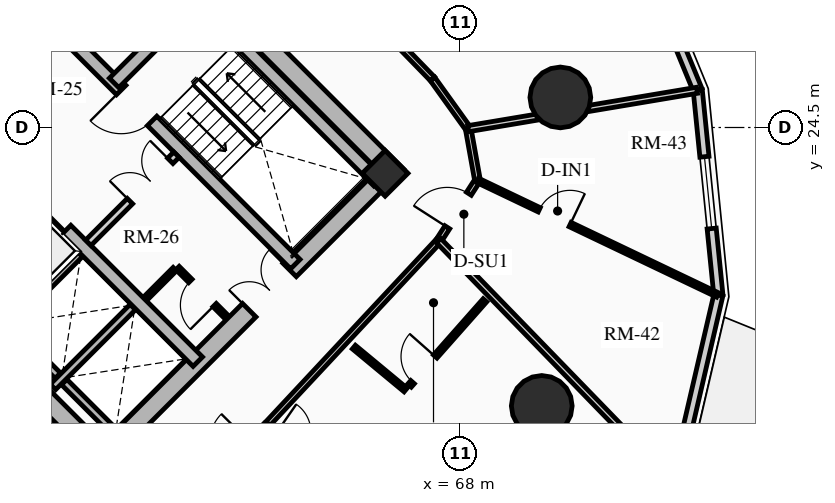
"""IFC4 building model, lengths in metres.
Left out: names, types, materials, properties, quantities, classifications, styles, units other than length and angle.
Written with IfcOpenShell. Run it as: python <this file> out.ifc"""

import sys

from ifc_helpers import new_model, si_unit, direction, frame, frame_2d, origin, origin_2d, place, context, subcontext, project, spatial, rectangle, circle, extrude, source, transform, mapped, element, fill, save


model = new_model("IFC4")
c1 = context("Model", 3, precision=1e-05, world=origin(), true_north=direction((0.0, 1.0)))
c2 = subcontext(c1, "Body", "Model", "MODEL_VIEW")
j1 = project(units=[si_unit("LENGTHUNIT", "METRE"), si_unit("PLANEANGLEUNIT", "RADIAN")], contexts=[c1])
p1 = place(None, origin())
s1 = spatial("IfcSite", under=j1, at=p1, CompositionType="ELEMENT")
p2 = place(p1, origin())
s2 = spatial("IfcBuilding", under=s1, at=p2, CompositionType="ELEMENT")
p3 = place(p2, frame((0.0, 0.0, 39.46)))
s3 = spatial("IfcBuildingStorey", under=s2, at=p3, CompositionType="ELEMENT", Elevation=39.46)
for number, where, z_axis, x_axis in (
    (1, (58.773, 15.661, 0.0), (0.0, 0.0, 1.0), (-0.707, 0.707, 0.0)),
    (2, (66.339, 23.227, 0.0), (0.0, 0.0, 1.0), (-0.707, 0.707, 0.0)),
):
    element("IfcWall", number, at=place(p3, frame(where, z_axis=z_axis, x_axis=x_axis)), inside=s3, PredefinedType="SHEAR", context=c2, shape_type="SweptSolid", body=[
        extrude(rectangle(XDim=14.3, YDim=0.5, at=frame_2d((7.15, 0.0))), origin(), (0.0, 0.0, 1.0), 2.91),
    ])
p4 = place(p3, frame((58.596, 15.838, 0.0), z_axis=(0.0, 0.0, 1.0), x_axis=(0.707106781187, 0.707106781187, 0.0)))
e3 = element("IfcWall", 3, at=p4, inside=s3, PredefinedType="SHEAR", context=c2, shape_type="SweptSolid", body=[
    extrude(rectangle(XDim=10.7, YDim=0.5, at=frame_2d((5.35, 0.0))), origin(), (0.0, 0.0, 1.0), 2.91),
])
m1 = source(origin(), c2, "Body", "SweptSolid", [
    extrude(rectangle(XDim=1.5, YDim=2.02, at=frame_2d((0.75, 1.01))), frame((0.0, 0.26, 0.0), z_axis=(0.0, -1.0, 0.0), x_axis=(1.0, 0.0, 0.0)), (0.0, 0.0, 1.0), 0.52),
])
p5 = place(p4, frame((5.45, 0.0, 0.0)))
e4 = element("IfcOpeningElement", 4, at=p5, cuts=e3, PredefinedType="OPENING", context=c2, shape_type="MappedRepresentation", body=[
    mapped(m1, transform((0.0, 0.0, 0.0), x_axis=(1.0, 0.0, 0.0), y_axis=(0.0, 1.0, 0.0), z_axis=(0.0, 0.0, 1.0), scale=1.0)),
])
p6 = place(p3, frame((61.096, 18.338, 0.0), z_axis=(0.0, 0.0, 1.0), x_axis=(-0.707106781187, 0.707106781187, 0.0)))
e5 = element("IfcWall", 5, at=p6, inside=s3, PredefinedType="SHEAR", context=c2, shape_type="SweptSolid", body=[
    extrude(rectangle(XDim=13.8, YDim=0.35, at=frame_2d((6.9, 0.0))), origin(), (0.0, 0.0, 1.0), 2.91),
])
m2 = source(origin(), c2, "Body", "SweptSolid", [
    extrude(rectangle(XDim=1.1, YDim=2.015, at=frame_2d((0.55, 1.007))), frame((0.0, 0.185, 0.0), z_axis=(0.0, -1.0, 0.0), x_axis=(1.0, 0.0, 0.0)), (0.0, 0.0, 1.0), 0.37),
])
p7 = place(p6, frame((4.9, 0.0, 0.0)))
e6 = element("IfcOpeningElement", 6, at=p7, cuts=e5, PredefinedType="OPENING", context=c2, shape_type="MappedRepresentation", body=[
    mapped(m2, transform((0.0, 0.0, 0.0), x_axis=(1.0, 0.0, 0.0), y_axis=(0.0, 1.0, 0.0), z_axis=(0.0, 0.0, 1.0), scale=1.0)),
])
m3 = source(origin(), c2, "Body", "SweptSolid", [
    extrude(rectangle(XDim=1.15, YDim=2.02, at=frame_2d((0.575, 1.01))), frame((0.0, 0.185, 0.0), z_axis=(0.0, -1.0, 0.0), x_axis=(1.0, 0.0, 0.0)), (0.0, 0.0, 1.0), 0.37),
])
p8 = place(p6, frame((7.32, 0.0, 0.0)))
e7 = element("IfcOpeningElement", 7, at=p8, cuts=e5, PredefinedType="OPENING", context=c2, shape_type="MappedRepresentation", body=[
    mapped(m3, transform((0.0, 0.0, 0.0), x_axis=(1.0, 0.0, 0.0), y_axis=(0.0, 1.0, 0.0), z_axis=(0.0, 0.0, 1.0), scale=1.0)),
])
p9 = place(p3, frame((63.662, 20.904, 0.0), z_axis=(0.0, 0.0, 1.0), x_axis=(-0.707106781187, 0.707106781187, 0.0)))
e8 = element("IfcWall", 8, at=p9, inside=s3, PredefinedType="SHEAR", context=c2, shape_type="SweptSolid", body=[
    extrude(rectangle(XDim=13.8, YDim=0.35, at=frame_2d((6.9, 0.0))), origin(), (0.0, 0.0, 1.0), 2.91),
])
p10 = place(p9, frame((10.025, 0.0, 0.0)))
e9 = element("IfcOpeningElement", 9, at=p10, cuts=e8, PredefinedType="OPENING", context=c2, shape_type="MappedRepresentation", body=[
    mapped(m2, transform((0.0, 0.0, 0.0), x_axis=(1.0, 0.0, 0.0), y_axis=(0.0, 1.0, 0.0), z_axis=(0.0, 0.0, 1.0), scale=1.0)),
])
p11 = place(p9, frame((12.025, 0.0, 0.0)))
e10 = element("IfcOpeningElement", 10, at=p11, cuts=e8, PredefinedType="OPENING", context=c2, shape_type="MappedRepresentation", body=[
    mapped(m2, transform((0.0, 0.0, 0.0), x_axis=(1.0, 0.0, 0.0), y_axis=(0.0, 1.0, 0.0), z_axis=(0.0, 0.0, 1.0), scale=1.0)),
])
p12 = place(p9, frame((5.33, 0.0, 0.0)))
e11 = element("IfcOpeningElement", 11, at=p12, cuts=e8, PredefinedType="OPENING", context=c2, shape_type="MappedRepresentation", body=[
    mapped(m3, transform((0.0, 0.0, 0.0), x_axis=(1.0, 0.0, 0.0), y_axis=(0.0, 1.0, 0.0), z_axis=(0.0, 0.0, 1.0), scale=1.0)),
])
p13 = place(p3, frame((65.847, 23.089, 0.0), z_axis=(0.0, 0.0, 1.0), x_axis=(-0.707106781187, 0.707106781187, 0.0)))
e12 = element("IfcWall", 12, at=p13, inside=s3, PredefinedType="SHEAR", context=c2, shape_type="SweptSolid", body=[
    extrude(rectangle(XDim=6.745, YDim=0.35, at=frame_2d((3.373, 0.0))), origin(), (0.0, 0.0, 1.0), 2.91),
])
p14 = place(p3, frame((58.893, 25.674, 0.0), z_axis=(0.0, 0.0, 1.0), x_axis=(0.707106781187, 0.707106781187, 0.0)))
e13 = element("IfcWall", 13, at=p14, inside=s3, PredefinedType="SHEAR", context=c2, shape_type="SweptSolid", body=[
    extrude(rectangle(XDim=3.285, YDim=0.35, at=frame_2d((1.643, 0.0))), origin(), (0.0, 0.0, 1.0), 2.91),
])
p15 = place(p3, frame((66.024, 23.294, 0.0), z_axis=(0.0, 0.0, 1.0), x_axis=(0.707106781187, 0.707106781187, 0.0)))
e14 = element("IfcColumn", 14, at=p15, inside=s3, PredefinedType="COLUMN", context=c2, shape_type="SweptSolid", body=[
    extrude(rectangle(XDim=0.85, YDim=0.85, at=origin_2d()), origin(), (0.0, 0.0, 1.0), 2.91),
])
for number, where, z_axis, x_axis in (
    (15, (70.146, 17.173, 0.0), (0.0, 0.0, 1.0), (1.0, 0.0, 0.0)),
    (16, (70.635, 25.291, 0.0), (0.0, 0.0, 1.0), (1.0, 0.0, 0.0)),
):
    element("IfcColumn", number, at=place(p3, frame(where, z_axis=z_axis, x_axis=x_axis)), inside=s3, PredefinedType="USERDEFINED", context=c2, shape_type="SweptSolid", body=[
        extrude(circle(Radius=0.8, at=origin_2d()), origin(), (0.0, 0.0, 1.0), 2.91),
    ])
p16 = place(p3, frame((74.794, 20.09, 0.0), z_axis=(0.0, 0.0, 1.0), x_axis=(-0.22582585901, -0.974167686491, 0.0)))
e17 = element("IfcWall", 17, at=p16, inside=s3, PredefinedType="SOLIDWALL", context=c2, shape_type="SweptSolid", body=[
    extrude(rectangle(XDim=5.092, YDim=0.24, at=frame_2d((2.546, 0.0))), origin(), (0.0, 0.0, 1.0), 2.073),
])
p17 = place(p3, frame((74.251, 25.482, 0.0), z_axis=(0.0, 0.0, 1.0), x_axis=(0.100190592135, -0.994968263437, 0.0)))
e18 = element("IfcWall", 18, at=p17, inside=s3, PredefinedType="SOLIDWALL", context=c2, shape_type="SweptSolid", body=[
    extrude(rectangle(XDim=5.419, YDim=0.24, at=frame_2d((2.71, 0.0))), origin(), (0.0, 0.0, 1.0), 2.073),
])
m4 = source(origin(), c2, "Body", "SweptSolid", [
    extrude(rectangle(XDim=1.9, YDim=1.35, at=frame_2d((0.95, 0.675))), frame((0.0, 0.13, 0.0), z_axis=(0.0, -1.0, 0.0), x_axis=(1.0, 0.0, 0.0)), (0.0, 0.0, 1.0), 0.26),
])
p18 = place(p17, frame((1.76, 0.0, 0.65)))
e19 = element("IfcOpeningElement", 19, at=p18, cuts=e18, PredefinedType="OPENING", context=c2, shape_type="MappedRepresentation", body=[
    mapped(m4, transform((0.0, 0.0, 0.0), x_axis=(1.0, 0.0, 0.0), y_axis=(0.0, 1.0, 0.0), z_axis=(0.0, 0.0, 1.0), scale=1.0)),
])
p19 = place(p3, frame((72.068, 30.778, 0.0), z_axis=(0.0, 0.0, 1.0), x_axis=(0.381077764176, -0.924542988536, 0.0)))
e20 = element("IfcWall", 20, at=p19, inside=s3, PredefinedType="SOLIDWALL", context=c2, shape_type="SweptSolid", body=[
    extrude(rectangle(XDim=5.728, YDim=0.24, at=frame_2d((2.864, 0.0))), origin(), (0.0, 0.0, 1.0), 2.073),
])
p20 = place(p3, frame((55.888, 19.069, 0.0), z_axis=(0.0, 0.0, 1.0), x_axis=(0.707106781187, 0.707106781187, 0.0)))
e21 = element("IfcWall", 21, at=p20, inside=s3, PredefinedType="SHEAR", context=c2, shape_type="SweptSolid", body=[
    extrude(rectangle(XDim=2.97, YDim=0.2, at=frame_2d((1.485, 0.0))), origin(), (0.0, 0.0, 1.0), 2.91),
])
p21 = place(p3, frame((57.284, 17.673, 0.0), z_axis=(0.0, 0.0, 1.0), x_axis=(0.707147878904, 0.70706568108, 0.0)))
e22 = element("IfcWall", 22, at=p21, inside=s3, PredefinedType="SHEAR", context=c2, shape_type="SweptSolid", body=[
    extrude(rectangle(XDim=2.97, YDim=0.2, at=frame_2d((1.485, 0.0))), origin(), (0.0, 0.0, 1.0), 2.91),
])
p22 = place(p3, frame((57.412, 17.97, 0.0), z_axis=(0.0, 0.0, 1.0), x_axis=(-0.707106781187, 0.707106781187, 0.0)))
e23 = element("IfcWall", 23, at=p22, inside=s3, PredefinedType="SHEAR", context=c2, shape_type="SweptSolid", body=[
    extrude(rectangle(XDim=1.735, YDim=0.2, at=frame_2d((0.867, 0.0))), origin(), (0.0, 0.0, 1.0), 2.91),
])
p23 = place(p3, frame((58.737, 16.644, 0.0), z_axis=(0.0, 0.0, 1.0), x_axis=(-0.707032117043, 0.707181437447, 0.0)))
e24 = element("IfcWall", 24, at=p23, inside=s3, PredefinedType="SHEAR", context=c2, shape_type="SweptSolid", body=[
    extrude(rectangle(XDim=1.635, YDim=0.2, at=frame_2d((0.817, 0.0))), origin(), (0.0, 0.0, 1.0), 2.91),
])
p24 = place(p3, frame((58.214, 21.467, 0.0), z_axis=(0.0, 0.0, 1.0), x_axis=(0.707106781187, 0.707106781187, 0.0)))
e25 = element("IfcWall", 25, at=p24, inside=s3, PredefinedType="PARTITIONING", context=c2, shape_type="SweptSolid", body=[
    extrude(rectangle(XDim=3.28, YDim=0.2, at=frame_2d((1.64, 0.0))), origin(), (0.0, 0.0, 1.0), 2.635),
])
m5 = source(origin(), c2, "Body", "SweptSolid", [
    extrude(rectangle(XDim=1.5, YDim=2.02, at=frame_2d((0.75, 1.01))), frame((0.0, 0.11, 0.0), z_axis=(0.0, -1.0, 0.0), x_axis=(1.0, 0.0, 0.0)), (0.0, 0.0, 1.0), 0.22),
])
p25 = place(p24, frame((1.55, 0.0, 0.0)))
e26 = element("IfcOpeningElement", 26, at=p25, cuts=e25, PredefinedType="OPENING", context=c2, shape_type="MappedRepresentation", body=[
    mapped(m5, transform((0.0, 0.0, 0.0), x_axis=(1.0, 0.0, 0.0), y_axis=(0.0, 1.0, 0.0), z_axis=(0.0, 0.0, 1.0), scale=1.0)),
])
p26 = place(p3, frame((54.961, 24.719, 0.0), z_axis=(0.0, 0.0, 1.0), x_axis=(0.707106781187, 0.707106781187, 0.0)))
e27 = element("IfcWall", 27, at=p26, inside=s3, PredefinedType="PARTITIONING", context=c2, shape_type="SweptSolid", body=[
    extrude(rectangle(XDim=3.28, YDim=0.2, at=frame_2d((1.64, 0.0))), origin(), (0.0, 0.0, 1.0), 2.635),
])
m6 = source(origin(), c2, "Body", "SweptSolid", [
    extrude(rectangle(XDim=0.9, YDim=2.005, at=frame_2d((0.45, 1.002))), frame((0.0, 0.11, 0.0), z_axis=(0.0, -1.0, 0.0), x_axis=(1.0, 0.0, 0.0)), (0.0, 0.0, 1.0), 0.22),
])
p27 = place(p26, frame((0.16, 0.0, 0.0)))
e28 = element("IfcOpeningElement", 28, at=p27, cuts=e27, PredefinedType="OPENING", context=c2, shape_type="MappedRepresentation", body=[
    mapped(m6, transform((0.0, 0.0, 0.0), x_axis=(1.0, 0.0, 0.0), y_axis=(0.0, 1.0, 0.0), z_axis=(0.0, 0.0, 1.0), scale=1.0)),
])
p28 = place(p3, frame((61.835, 19.529, 0.0), z_axis=(0.0, 0.0, 1.0), x_axis=(-0.707174592913, 0.707038962956, 0.0)))
e29 = element("IfcWall", 29, at=p28, inside=s3, PredefinedType="PARTITIONING", context=c2, shape_type="SweptSolid", body=[
    extrude(rectangle(XDim=1.8, YDim=0.125, at=frame_2d((0.9, 0.0))), origin(), (0.0, 0.0, 1.0), 2.635),
])
m7 = source(origin(), c2, "Body", "SweptSolid", [
    extrude(rectangle(XDim=0.9, YDim=2.005, at=frame_2d((0.45, 1.002))), frame((0.0, 0.073, 0.0), z_axis=(0.0, -1.0, 0.0), x_axis=(1.0, 0.0, 0.0)), (0.0, 0.0, 1.0), 0.145),
])
p29 = place(p28, frame((0.42, 0.0, 0.0)))
e30 = element("IfcOpeningElement", 30, at=p29, cuts=e29, PredefinedType="OPENING", context=c2, shape_type="MappedRepresentation", body=[
    mapped(m7, transform((0.0, 0.0, 0.0), x_axis=(1.0, 0.0, 0.0), y_axis=(0.0, 1.0, 0.0), z_axis=(0.0, 0.0, 1.0), scale=1.0)),
])
p30 = place(p3, frame((59.713, 19.996, 0.0), z_axis=(0.0, 0.0, 1.0), x_axis=(0.707217726, 0.706995818963, 0.0)))
e31 = element("IfcWall", 31, at=p30, inside=s3, PredefinedType="PARTITIONING", context=c2, shape_type="SweptSolid", body=[
    extrude(rectangle(XDim=1.1, YDim=0.125, at=frame_2d((0.55, 0.0))), origin(), (0.0, 0.0, 1.0), 2.635),
])
p31 = place(p3, frame((62.903, 16.667, 0.0), z_axis=(0.0, 0.0, 1.0), x_axis=(0.682371947497, 0.731005147225, 0.0)))
e32 = element("IfcWall", 32, at=p31, inside=s3, PredefinedType="PARTITIONING", context=c2, shape_type="SweptSolid", body=[
    extrude(rectangle(XDim=6.642, YDim=0.15, at=frame_2d((3.321, 0.0))), origin(), (0.0, 0.0, 1.0), 2.159),
])
p32 = place(p3, frame((67.435, 21.521, 0.0), z_axis=(0.0, 0.0, 1.0), x_axis=(0.540777197838, 0.841165870859, 0.0)))
e33 = element("IfcWall", 33, at=p32, inside=s3, PredefinedType="PARTITIONING", context=c2, shape_type="SweptSolid", body=[
    extrude(rectangle(XDim=1.888, YDim=0.15, at=frame_2d((0.944, 0.0))), origin(), (0.0, 0.0, 1.0), 2.205),
])
m8 = source(origin(), c2, "Body", "SweptSolid", [
    extrude(rectangle(XDim=1.05, YDim=2.015, at=frame_2d((0.525, 1.007))), frame((0.0, 0.085, 0.0), z_axis=(0.0, -1.0, 0.0), x_axis=(1.0, 0.0, 0.0)), (0.0, 0.0, 1.0), 0.17),
])
p33 = place(p32, frame((0.419, 0.0, 0.0)))
e34 = element("IfcOpeningElement", 34, at=p33, cuts=e33, PredefinedType="OPENING", context=c2, shape_type="MappedRepresentation", body=[
    mapped(m8, transform((0.0, 0.0, 0.0), x_axis=(1.0, 0.0, 0.0), y_axis=(0.0, 1.0, 0.0), z_axis=(0.0, 0.0, 1.0), scale=1.0)),
])
p34 = place(p3, frame((68.456, 23.11, 0.0), z_axis=(0.0, 0.0, 1.0), x_axis=(-0.1772522795, 0.984165448191, 0.0)))
e35 = element("IfcWall", 35, at=p34, inside=s3, PredefinedType="PARTITIONING", context=c2, shape_type="SweptSolid", body=[
    extrude(rectangle(XDim=1.382, YDim=0.15, at=frame_2d((0.691, 0.0))), origin(), (0.0, 0.0, 1.0), 2.159),
])
p35 = place(p3, frame((68.211, 24.469, 0.0), z_axis=(0.0, 0.0, 1.0), x_axis=(-0.583012141368, 0.812463441034, 0.0)))
e36 = element("IfcWall", 36, at=p35, inside=s3, PredefinedType="PARTITIONING", context=c2, shape_type="SweptSolid", body=[
    extrude(rectangle(XDim=1.613, YDim=0.15, at=frame_2d((0.807, 0.0))), origin(), (0.0, 0.0, 1.0), 2.205),
])
p36 = place(p3, frame((67.27, 25.78, 0.0), z_axis=(0.0, 0.0, 1.0), x_axis=(-0.696847842907, 0.717218992942, 0.0)))
e37 = element("IfcWall", 37, at=p36, inside=s3, PredefinedType="PARTITIONING", context=c2, shape_type="SweptSolid", body=[
    extrude(rectangle(XDim=6.004, YDim=0.15, at=frame_2d((3.002, 0.0))), origin(), (0.0, 0.0, 1.0), 2.635),
])
m9 = source(origin(), c2, "Body", "SweptSolid", [
    extrude(rectangle(XDim=1.0, YDim=2.015, at=frame_2d((0.5, 1.007))), frame((0.0, 0.085, 0.0), z_axis=(0.0, -1.0, 0.0), x_axis=(1.0, 0.0, 0.0)), (0.0, 0.0, 1.0), 0.17),
])
p37 = place(p36, frame((2.502, 0.0, 0.0)))
e38 = element("IfcOpeningElement", 38, at=p37, cuts=e37, PredefinedType="OPENING", context=c2, shape_type="MappedRepresentation", body=[
    mapped(m9, transform((0.0, 0.0, 0.0), x_axis=(1.0, 0.0, 0.0), y_axis=(0.0, 1.0, 0.0), z_axis=(0.0, 0.0, 1.0), scale=1.0)),
])
p38 = place(p3, frame((67.435, 21.521, 0.0), z_axis=(0.0, 0.0, 1.0), x_axis=(0.6962628802, -0.717786877601, 0.0)))
e39 = element("IfcWall", 39, at=p38, inside=s3, PredefinedType="PARTITIONING", context=c2, shape_type="SweptSolid", body=[
    extrude(rectangle(XDim=8.893, YDim=0.16, at=frame_2d((4.446, 0.0))), origin(), (0.0, 0.0, 1.0), 2.073),
])
p39 = place(p3, frame((68.211, 24.469, 0.0), z_axis=(0.0, 0.0, 1.0), x_axis=(0.986231309699, 0.165371713934, 0.0)))
e40 = element("IfcWall", 40, at=p39, inside=s3, PredefinedType="PARTITIONING", context=c2, shape_type="SweptSolid", body=[
    extrude(rectangle(XDim=6.104, YDim=0.16, at=frame_2d((3.052, 0.0))), origin(), (0.0, 0.0, 1.0), 2.073),
])
p40 = place(p3, frame((65.202, 18.721, 0.0), z_axis=(0.0, 0.0, 1.0), x_axis=(0.769814202386, -0.638268042287, 0.0)))
e41 = element("IfcWall", 41, at=p40, inside=s3, PredefinedType="PARTITIONING", context=c2, shape_type="SweptSolid", body=[
    extrude(rectangle(XDim=1.769, YDim=0.125, at=frame_2d((0.884, 0.0))), origin(), (0.0, 0.0, 1.0), 2.635),
])
p41 = place(p3, frame((66.667, 17.709, 0.0), z_axis=(0.0, 0.0, 1.0), x_axis=(0.662510581678, 0.749052554341, 0.0)))
e42 = element("IfcWall", 42, at=p41, inside=s3, PredefinedType="PARTITIONING", context=c2, shape_type="SweptSolid", body=[
    extrude(rectangle(XDim=2.996, YDim=0.125, at=frame_2d((1.498, 0.0))), origin(), (0.0, 0.0, 1.0), 2.159),
])
p42 = place(p41, frame((0.12, 0.0, 0.0)))
e43 = element("IfcOpeningElement", 43, at=p42, cuts=e42, PredefinedType="OPENING", context=c2, shape_type="MappedRepresentation", body=[
    mapped(m7, transform((0.0, 0.0, 0.0), x_axis=(1.0, 0.0, 0.0), y_axis=(0.0, 1.0, 0.0), z_axis=(0.0, 0.0, 1.0), scale=1.0)),
])
p43 = place(p3, frame((68.456, 23.11, 0.0), z_axis=(0.0, 0.0, 1.0), x_axis=(0.902430819297, -0.430834790125, 0.0)))
e44 = element("IfcWall", 44, at=p43, inside=s3, PredefinedType="PARTITIONING", context=c2, shape_type="SweptSolid", body=[
    extrude(rectangle(XDim=7.002, YDim=0.125, at=frame_2d((3.501, 0.0))), origin(), (0.0, 0.0, 1.0), 2.073),
])
p44 = place(p43, frame((1.8, 0.0, 0.0)))
e45 = element("IfcOpeningElement", 45, at=p44, cuts=e44, PredefinedType="OPENING", context=c2, shape_type="MappedRepresentation", body=[
    mapped(m7, transform((0.0, 0.0, 0.0), x_axis=(1.0, 0.0, 0.0), y_axis=(0.0, 1.0, 0.0), z_axis=(0.0, 0.0, 1.0), scale=1.0)),
])
m10 = source(origin(), c2, "Body", "SweptSolid", [
    extrude(rectangle(XDim=1.9, YDim=1.35, at=frame_2d((0.95, 0.675))), frame((0.0, 0.03, 0.0), z_axis=(0.0, -1.0, 0.0), x_axis=(1.0, 0.0, 0.0)), (0.0, 0.0, 1.0), 0.06),
])
p45 = place(p18, origin())
e46 = element("IfcWindow", 46, at=p45, inside=s3, PartitioningType="DOUBLE_PANEL_VERTICAL", PredefinedType="WINDOW", context=c2, shape_type="MappedRepresentation", body=[
    mapped(m10, transform((0.0, 0.0, 0.0), x_axis=(1.0, 0.0, 0.0), y_axis=(0.0, 1.0, 0.0), z_axis=(0.0, 0.0, 1.0), scale=1.0)),
])
fill(e19, e46)
m11 = source(origin(), c2, "Body", "SweptSolid", [
    extrude(rectangle(XDim=1.1, YDim=2.015, at=frame_2d((0.55, 1.007))), frame((0.0, 0.025, 0.0), z_axis=(0.0, -1.0, 0.0), x_axis=(1.0, 0.0, 0.0)), (0.0, 0.0, 1.0), 0.05),
])
p46 = place(p7, origin())
e47 = element("IfcDoor", 47, at=p46, inside=s3, OperationType="SLIDING_TO_LEFT", PredefinedType="DOOR", context=c2, shape_type="MappedRepresentation", body=[
    mapped(m11, transform((0.0, 0.0, 0.0), x_axis=(1.0, 0.0, 0.0), y_axis=(0.0, 1.0, 0.0), z_axis=(0.0, 0.0, 1.0), scale=1.0)),
])
fill(e6, e47)
m12 = source(origin(), c2, "Body", "SweptSolid", [
    extrude(rectangle(XDim=1.15, YDim=2.02, at=frame_2d((0.575, 1.01))), frame((0.0, 0.025, 0.0), z_axis=(0.0, -1.0, 0.0), x_axis=(1.0, 0.0, 0.0)), (0.0, 0.0, 1.0), 0.05),
])
p47 = place(p12, origin())
e48 = element("IfcDoor", 48, at=p47, inside=s3, OperationType="SINGLE_SWING_RIGHT", PredefinedType="DOOR", context=c2, shape_type="MappedRepresentation", body=[
    mapped(m12, transform((0.0, 0.0, 0.0), x_axis=(1.0, 0.0, 0.0), y_axis=(0.0, 1.0, 0.0), z_axis=(0.0, 0.0, 1.0), scale=1.0)),
])
fill(e11, e48)
m13 = source(origin(), c2, "Body", "SweptSolid", [
    extrude(rectangle(XDim=1.5, YDim=2.02, at=frame_2d((0.75, 1.01))), frame((0.0, 0.025, 0.0), z_axis=(0.0, -1.0, 0.0), x_axis=(1.0, 0.0, 0.0)), (0.0, 0.0, 1.0), 0.05),
])
p48 = place(p5, origin())
e49 = element("IfcDoor", 49, at=p48, inside=s3, OperationType="DOUBLE_DOOR_SINGLE_SWING", PredefinedType="DOOR", context=c2, shape_type="MappedRepresentation", body=[
    mapped(m13, transform((0.0, 0.0, 0.0), x_axis=(1.0, 0.0, 0.0), y_axis=(0.0, 1.0, 0.0), z_axis=(0.0, 0.0, 1.0), scale=1.0)),
])
fill(e4, e49)
p49 = place(p25, origin())
e50 = element("IfcDoor", 50, at=p49, inside=s3, OperationType="DOUBLE_DOOR_SINGLE_SWING", PredefinedType="DOOR", context=c2, shape_type="MappedRepresentation", body=[
    mapped(m13, transform((0.0, 0.0, 0.0), x_axis=(1.0, 0.0, 0.0), y_axis=(0.0, 1.0, 0.0), z_axis=(0.0, 0.0, 1.0), scale=1.0)),
])
fill(e26, e50)
m14 = source(origin(), c2, "Body", "SweptSolid", [
    extrude(rectangle(XDim=0.9, YDim=2.005, at=frame_2d((0.45, 1.002))), frame((0.0, 0.025, 0.0), z_axis=(0.0, -1.0, 0.0), x_axis=(1.0, 0.0, 0.0)), (0.0, 0.0, 1.0), 0.05),
])
p50 = place(p29, origin())
e51 = element("IfcDoor", 51, at=p50, inside=s3, OperationType="SINGLE_SWING_LEFT", PredefinedType="DOOR", context=c2, shape_type="MappedRepresentation", body=[
    mapped(m14, transform((0.0, 0.0, 0.0), x_axis=(1.0, 0.0, 0.0), y_axis=(0.0, 1.0, 0.0), z_axis=(0.0, 0.0, 1.0), scale=1.0)),
])
fill(e30, e51)
p51 = place(p42, origin())
e52 = element("IfcDoor", 52, at=p51, inside=s3, OperationType="SINGLE_SWING_RIGHT", PredefinedType="DOOR", context=c2, shape_type="MappedRepresentation", body=[
    mapped(m14, transform((0.0, 0.0, 0.0), x_axis=(1.0, 0.0, 0.0), y_axis=(0.0, 1.0, 0.0), z_axis=(0.0, 0.0, 1.0), scale=1.0)),
])
fill(e43, e52)
m15 = source(origin(), c2, "Body", "SweptSolid", [
    extrude(rectangle(XDim=1.05, YDim=2.015, at=frame_2d((0.525, 1.007))), frame((0.0, 0.025, 0.0), z_axis=(0.0, -1.0, 0.0), x_axis=(1.0, 0.0, 0.0)), (0.0, 0.0, 1.0), 0.05),
])
p52 = place(p33, origin())
e53 = element("IfcDoor", 53, at=p52, inside=s3, OperationType="SINGLE_SWING_LEFT", PredefinedType="DOOR", context=c2, shape_type="MappedRepresentation", body=[
    mapped(m15, transform((0.0, 0.0, 0.0), x_axis=(1.0, 0.0, 0.0), y_axis=(0.0, 1.0, 0.0), z_axis=(0.0, 0.0, 1.0), scale=1.0)),
])
fill(e34, e53)
p53 = place(p44, origin())
e54 = element("IfcDoor", 54, at=p53, inside=s3, OperationType="SINGLE_SWING_RIGHT", PredefinedType="DOOR", context=c2, shape_type="MappedRepresentation", body=[
    mapped(m14, transform((0.0, 0.0, 0.0), x_axis=(1.0, 0.0, 0.0), y_axis=(0.0, 1.0, 0.0), z_axis=(0.0, 0.0, 1.0), scale=1.0)),
])
fill(e45, e54)
save(model, sys.argv[1])
